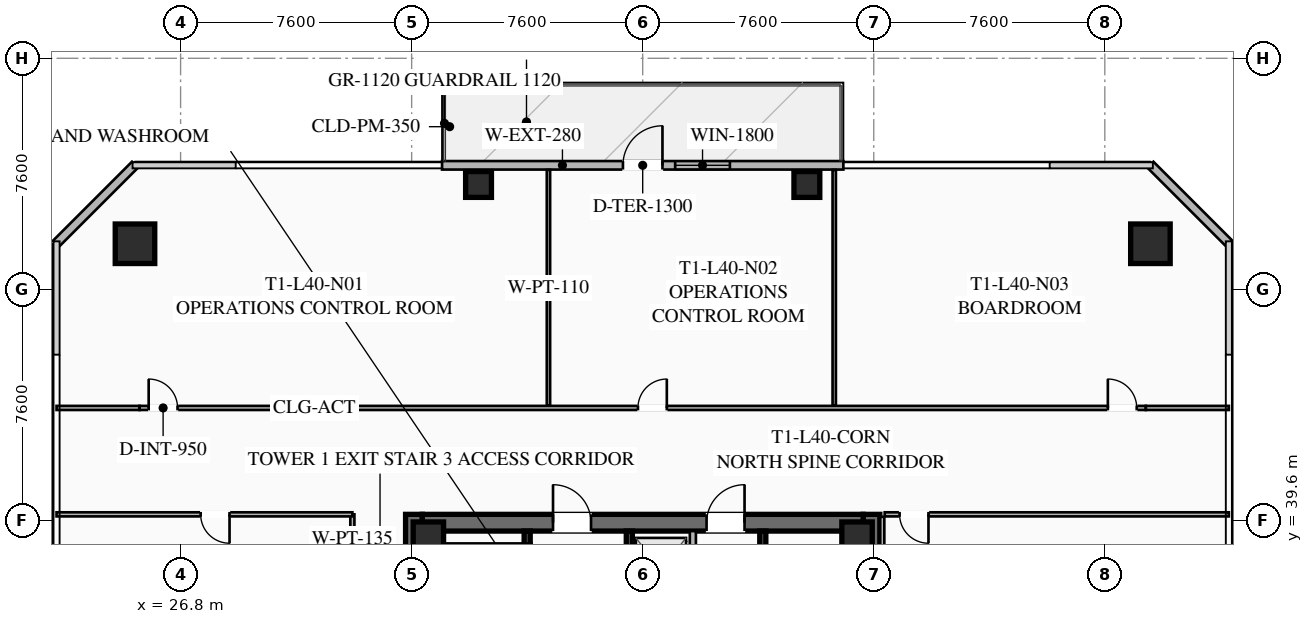
"""IFC4 building model, lengths in metres.
Left out: names, types, materials, properties, quantities, classifications, styles, units other than length and angle.
Written with IfcOpenShell. Run it as: python <this file> out.ifc"""

import sys

from ifc_helpers import new_model, si_unit, direction, frame, frame_2d, origin, origin_2d, place, context, subcontext, project, spatial, rectangle, hollow_rectangle, extrude, element, fill, save


model = new_model("IFC4")
c1 = context("Model", 3, precision=1e-05, world=origin(), true_north=direction((0.0, 1.0)))
c2 = subcontext(c1, "Body", "Model", "MODEL_VIEW")
j1 = project(units=[si_unit("LENGTHUNIT", "METRE"), si_unit("PLANEANGLEUNIT", "RADIAN")], contexts=[c1])
p1 = place(None, origin())
s1 = spatial("IfcSite", under=j1, at=p1, CompositionType="ELEMENT")
p2 = place(p1, origin())
s2 = spatial("IfcBuilding", under=s1, at=p2, CompositionType="ELEMENT")
p3 = place(p2, frame((0.0, 0.0, 149.9)))
s3 = spatial("IfcBuildingStorey", under=s2, at=p3, CompositionType="ELEMENT", Elevation=149.9)
for number, where, z_axis, x_axis in (
    (1, (34.475, 24.2, 0.0), (0.0, 0.0, 1.0), (0.0, 1.0, 0.0)),
    (2, (49.525, 39.8, 0.0), (0.0, 0.0, 1.0), (0.0, -1.0, 0.0)),
):
    element("IfcWall", number, at=place(p3, frame(where, z_axis=z_axis, x_axis=x_axis)), inside=s3, PredefinedType="SHEAR", context=c2, shape_type="SweptSolid", body=[
        extrude(rectangle(XDim=15.6, YDim=0.55, at=frame_2d((7.8, 0.0))), origin(), (0.0, 0.0, 1.0), 3.55),
    ])
p4 = place(p3, frame((34.75, 39.525, 0.0), z_axis=(0.0, 0.0, 1.0), x_axis=(1.0, 0.0, 0.0)))
e3 = element("IfcWall", 3, at=p4, inside=s3, PredefinedType="SHEAR", context=c2, shape_type="SweptSolid", body=[
    extrude(rectangle(XDim=14.5, YDim=0.55, at=frame_2d((7.25, 0.0))), origin(), (0.0, 0.0, 1.0), 3.55),
])
p5 = place(p4, frame((4.3, 0.0, 0.0)))
e4 = element("IfcOpeningElement", 4, at=p5, cuts=e3, PredefinedType="OPENING", context=c2, shape_type="SweptSolid", body=[
    extrude(rectangle(XDim=1.25, YDim=2.25, at=frame_2d((0.625, 1.125))), frame((0.0, 0.285, 0.0), z_axis=(0.0, -1.0, 0.0), x_axis=(1.0, 0.0, 0.0)), (0.0, 0.0, 1.0), 0.57),
])
p6 = place(p4, frame((9.35, 0.0, 0.0)))
e5 = element("IfcOpeningElement", 5, at=p6, cuts=e3, PredefinedType="OPENING", context=c2, shape_type="SweptSolid", body=[
    extrude(rectangle(XDim=1.25, YDim=2.25, at=frame_2d((0.625, 1.125))), frame((0.0, 0.285, 0.0), z_axis=(0.0, -1.0, 0.0), x_axis=(1.0, 0.0, 0.0)), (0.0, 0.0, 1.0), 0.57),
])
for number, where, z_axis, x_axis in (
    (6, (49.05, 39.05, 0.0), (0.0, 0.0, 1.0), (1.0, 0.0, 0.0)),
    (7, (34.95, 39.05, 0.0), (0.0, 0.0, 1.0), (1.0, 0.0, 0.0)),
):
    element("IfcColumn", number, at=place(p3, frame(where, z_axis=z_axis, x_axis=x_axis)), inside=s3, PredefinedType="COLUMN", context=c2, shape_type="SweptSolid", body=[
        extrude(hollow_rectangle(XDim=1.0, YDim=1.0, WallThickness=0.04, at=origin_2d()), origin(), (0.0, 0.0, 1.0), 3.37),
    ])
for number, where, z_axis, x_axis in (
    (8, (58.7, 48.7, 0.0), (0.0, 0.0, 1.0), (1.0, 0.0, 0.0)),
    (9, (25.3, 48.7, 0.0), (0.0, 0.0, 1.0), (1.0, 0.0, 0.0)),
):
    element("IfcColumn", number, at=place(p3, frame(where, z_axis=z_axis, x_axis=x_axis)), inside=s3, PredefinedType="COLUMN", context=c2, shape_type="SweptSolid", body=[
        extrude(hollow_rectangle(XDim=1.3, YDim=1.3, WallThickness=0.05, at=origin_2d()), origin(), (0.0, 0.0, 1.0), 3.37),
    ])
for number, where, z_axis, x_axis in (
    (10, (47.4, 50.65, 0.0), (0.0, 0.0, 1.0), (1.0, 0.0, 0.0)),
    (11, (36.6, 50.65, 0.0), (0.0, 0.0, 1.0), (1.0, 0.0, 0.0)),
):
    element("IfcColumn", number, at=place(p3, frame(where, z_axis=z_axis, x_axis=x_axis)), inside=s3, PredefinedType="COLUMN", context=c2, shape_type="SweptSolid", body=[
        extrude(hollow_rectangle(XDim=0.85, YDim=0.85, WallThickness=0.035, at=origin_2d()), origin(), (0.0, 0.0, 1.0), 3.37),
    ])
p7 = place(p3, frame((35.4, 51.28, 0.0), z_axis=(0.0, 0.0, 1.0), x_axis=(1.0, 0.0, 0.0)))
e12 = element("IfcWall", 12, at=p7, inside=s3, PredefinedType="SOLIDWALL", context=c2, shape_type="SweptSolid", body=[
    extrude(rectangle(XDim=13.2, YDim=0.28, at=frame_2d((6.6, 0.0))), origin(), (0.0, 0.0, 1.0), 3.37),
])
p8 = place(p7, frame((5.95, 0.0, 0.0)))
e13 = element("IfcOpeningElement", 13, at=p8, cuts=e12, PredefinedType="OPENING", context=c2, shape_type="SweptSolid", body=[
    extrude(rectangle(XDim=1.3, YDim=2.15, at=frame_2d((0.65, 1.075))), frame((0.0, 0.15, 0.0), z_axis=(0.0, -1.0, 0.0), x_axis=(1.0, 0.0, 0.0)), (0.0, 0.0, 1.0), 0.3),
])
p9 = place(p7, frame((7.668, 0.0, 0.85)))
e14 = element("IfcOpeningElement", 14, at=p9, cuts=e12, PredefinedType="OPENING", context=c2, shape_type="SweptSolid", body=[
    extrude(rectangle(XDim=1.8, YDim=1.92, at=frame_2d((0.9, 0.96))), frame((0.0, 0.15, 0.0), z_axis=(0.0, -1.0, 0.0), x_axis=(1.0, 0.0, 0.0)), (0.0, 0.0, 1.0), 0.3),
])
for number, where, z_axis, x_axis in (
    (15, (22.7, 48.7, 0.0), (0.0, 0.0, 1.0), (0.707, 0.707, 0.0)),
    (16, (58.7, 51.3, 0.0), (0.0, 0.0, 1.0), (0.707, -0.707, 0.0)),
):
    element("IfcWall", number, at=place(p3, frame(where, z_axis=z_axis, x_axis=x_axis)), inside=s3, PredefinedType="SOLIDWALL", context=c2, shape_type="SweptSolid", body=[
        extrude(rectangle(XDim=3.677, YDim=0.28, at=frame_2d((1.838, 0.0))), origin(), (0.0, 0.0, 1.0), 3.37),
    ])
p10 = place(p3, frame((38.2, 31.2, 0.0), z_axis=(0.0, 0.0, 1.0), x_axis=(0.0, 1.0, 0.0)))
e17 = element("IfcWall", 17, at=p10, inside=s3, PredefinedType="SHEAR", context=c2, shape_type="SweptSolid", body=[
    extrude(rectangle(XDim=8.05, YDim=0.2, at=frame_2d((4.025, 0.0))), origin(), (0.0, 0.0, 1.0), 3.37),
])
p11 = place(p10, frame((0.45, 0.0, 0.0)))
e18 = element("IfcOpeningElement", 18, at=p11, cuts=e17, PredefinedType="OPENING", context=c2, shape_type="SweptSolid", body=[
    extrude(rectangle(XDim=1.15, YDim=2.2, at=frame_2d((0.575, 1.1))), frame((0.0, 0.11, 0.0), z_axis=(0.0, -1.0, 0.0), x_axis=(1.0, 0.0, 0.0)), (0.0, 0.0, 1.0), 0.22),
])
p12 = place(p3, frame((41.56, 24.75, 0.0), z_axis=(0.0, 0.0, 1.0), x_axis=(0.0, 1.0, 0.0)))
e19 = element("IfcWall", 19, at=p12, inside=s3, PredefinedType="SHEAR", context=c2, shape_type="SweptSolid", body=[
    extrude(rectangle(XDim=14.5, YDim=0.2, at=frame_2d((7.25, 0.0))), origin(), (0.0, 0.0, 1.0), 3.37),
])
p13 = place(p3, frame((45.95, 39.25, 0.0), z_axis=(0.0, 0.0, 1.0), x_axis=(0.0, -1.0, 0.0)))
e20 = element("IfcWall", 20, at=p13, inside=s3, PredefinedType="SHEAR", context=c2, shape_type="SweptSolid", body=[
    extrude(rectangle(XDim=6.45, YDim=0.2, at=frame_2d((3.225, 0.0))), origin(), (0.0, 0.0, 1.0), 3.37),
])
p14 = place(p3, frame((43.65, 32.35, 0.0), z_axis=(0.0, 0.0, 1.0), x_axis=(0.0, 1.0, 0.0)))
e21 = element("IfcWall", 21, at=p14, inside=s3, PredefinedType="SOLIDWALL", context=c2, shape_type="SweptSolid", body=[
    extrude(rectangle(XDim=6.9, YDim=0.2, at=frame_2d((3.45, 0.0))), origin(), (0.0, 0.0, 1.0), 3.37),
])
p15 = place(p14, frame((0.575, 0.0, 0.0)))
e22 = element("IfcOpeningElement", 22, at=p15, cuts=e21, PredefinedType="OPENING", context=c2, shape_type="SweptSolid", body=[
    extrude(rectangle(XDim=1.1, YDim=2.2, at=frame_2d((0.55, 1.1))), frame((0.0, 0.11, 0.0), z_axis=(0.0, -1.0, 0.0), x_axis=(1.0, 0.0, 0.0)), (0.0, 0.0, 1.0), 0.22),
])
p16 = place(p14, frame((2.825, 0.0, 0.0)))
e23 = element("IfcOpeningElement", 23, at=p16, cuts=e21, PredefinedType="OPENING", context=c2, shape_type="SweptSolid", body=[
    extrude(rectangle(XDim=1.1, YDim=2.2, at=frame_2d((0.55, 1.1))), frame((0.0, 0.11, 0.0), z_axis=(0.0, -1.0, 0.0), x_axis=(1.0, 0.0, 0.0)), (0.0, 0.0, 1.0), 0.22),
])
p17 = place(p14, frame((5.075, 0.0, 0.0)))
e24 = element("IfcOpeningElement", 24, at=p17, cuts=e21, PredefinedType="OPENING", context=c2, shape_type="SweptSolid", body=[
    extrude(rectangle(XDim=1.1, YDim=2.2, at=frame_2d((0.55, 1.1))), frame((0.0, 0.11, 0.0), z_axis=(0.0, -1.0, 0.0), x_axis=(1.0, 0.0, 0.0)), (0.0, 0.0, 1.0), 0.22),
])
p18 = place(p3, frame((32.45, 35.4, 0.0), z_axis=(0.0, 0.0, 1.0), x_axis=(0.0, 1.0, 0.0)))
e25 = element("IfcWall", 25, at=p18, inside=s3, PredefinedType="PARTITIONING", context=c2, shape_type="SweptSolid", body=[
    extrude(rectangle(XDim=4.4, YDim=0.135, at=frame_2d((2.2, 0.0))), origin(), (0.0, 0.0, 1.0), 2.723),
])
p19 = place(p3, frame((25.45, 43.3, 0.0), z_axis=(0.0, 0.0, 1.0), x_axis=(1.0, 0.0, 0.0)))
e26 = element("IfcWall", 26, at=p19, inside=s3, PredefinedType="PARTITIONING", context=c2, shape_type="SweptSolid", body=[
    extrude(rectangle(XDim=33.1, YDim=0.135, at=frame_2d((16.55, 0.0))), origin(), (0.0, 0.0, 1.0), 2.723),
])
p20 = place(p19, frame((0.3, 0.0, 0.0)))
e27 = element("IfcOpeningElement", 27, at=p20, cuts=e26, PredefinedType="OPENING", context=c2, shape_type="SweptSolid", body=[
    extrude(rectangle(XDim=0.95, YDim=2.05, at=frame_2d((0.475, 1.025))), frame((0.0, 0.077, 0.0), z_axis=(0.0, -1.0, 0.0), x_axis=(1.0, 0.0, 0.0)), (0.0, 0.0, 1.0), 0.155),
])
p21 = place(p19, frame((16.393, 0.0, 0.0)))
e28 = element("IfcOpeningElement", 28, at=p21, cuts=e26, PredefinedType="OPENING", context=c2, shape_type="SweptSolid", body=[
    extrude(rectangle(XDim=0.95, YDim=2.05, at=frame_2d((0.475, 1.025))), frame((0.0, 0.077, 0.0), z_axis=(0.0, -1.0, 0.0), x_axis=(1.0, 0.0, 0.0)), (0.0, 0.0, 1.0), 0.155),
])
p22 = place(p19, frame((31.85, 0.0, 0.0)))
e29 = element("IfcOpeningElement", 29, at=p22, cuts=e26, PredefinedType="OPENING", context=c2, shape_type="SweptSolid", body=[
    extrude(rectangle(XDim=0.95, YDim=2.05, at=frame_2d((0.475, 1.025))), frame((0.0, 0.077, 0.0), z_axis=(0.0, -1.0, 0.0), x_axis=(1.0, 0.0, 0.0)), (0.0, 0.0, 1.0), 0.155),
])
for number, where, z_axis, x_axis in (
    (30, (22.72, 43.3, 0.0), (0.0, 0.0, 1.0), (1.0, 0.0, 0.0)),
    (31, (58.55, 43.3, 0.0), (0.0, 0.0, 1.0), (1.0, 0.0, 0.0)),
):
    element("IfcWall", number, at=place(p3, frame(where, z_axis=z_axis, x_axis=x_axis)), inside=s3, PredefinedType="PARTITIONING", context=c2, shape_type="SweptSolid", body=[
        extrude(rectangle(XDim=2.73, YDim=0.135, at=frame_2d((1.365, 0.0))), origin(), (0.0, 0.0, 1.0), 2.723),
    ])
for number, where, z_axis, x_axis in (
    (32, (38.9, 43.38, 0.0), (0.0, 0.0, 1.0), (0.0, 1.0, 0.0)),
    (33, (48.3, 43.38, 0.0), (0.0, 0.0, 1.0), (0.0, 1.0, 0.0)),
):
    element("IfcWall", number, at=place(p3, frame(where, z_axis=z_axis, x_axis=x_axis)), inside=s3, PredefinedType="PARTITIONING", context=c2, shape_type="SweptSolid", body=[
        extrude(rectangle(XDim=7.75, YDim=0.11, at=frame_2d((3.875, 0.0))), origin(), (0.0, 0.0, 1.0), 2.723),
    ])
p23 = place(p3, frame((49.88, 39.72, 0.0), z_axis=(0.0, 0.0, 1.0), x_axis=(0.0, -1.0, 0.0)))
e34 = element("IfcWall", 34, at=p23, inside=s3, PredefinedType="PARTITIONING", context=c2, shape_type="SweptSolid", body=[
    extrude(rectangle(XDim=15.44, YDim=0.135, at=frame_2d((7.72, 0.0))), origin(), (0.0, 0.0, 1.0), 2.723),
])
p24 = place(p3, frame((61.28, 39.8, 0.0), z_axis=(0.0, 0.0, 1.0), x_axis=(-1.0, 0.0, 0.0)))
e35 = element("IfcWall", 35, at=p24, inside=s3, PredefinedType="PARTITIONING", context=c2, shape_type="SweptSolid", body=[
    extrude(rectangle(XDim=11.32, YDim=0.135, at=frame_2d((5.66, 0.0))), origin(), (0.0, 0.0, 1.0), 2.723),
])
p25 = place(p24, frame((9.88, 0.0, 0.0)))
e36 = element("IfcOpeningElement", 36, at=p25, cuts=e35, PredefinedType="OPENING", context=c2, shape_type="SweptSolid", body=[
    extrude(rectangle(XDim=0.95, YDim=2.05, at=frame_2d((0.475, 1.025))), frame((0.0, 0.077, 0.0), z_axis=(0.0, -1.0, 0.0), x_axis=(1.0, 0.0, 0.0)), (0.0, 0.0, 1.0), 0.155),
])
p26 = place(p3, frame((32.45, 39.8, 0.0), z_axis=(0.0, 0.0, 1.0), x_axis=(-1.0, 0.0, 0.0)))
e37 = element("IfcWall", 37, at=p26, inside=s3, PredefinedType="PARTITIONING", context=c2, shape_type="SweptSolid", body=[
    extrude(rectangle(XDim=9.73, YDim=0.135, at=frame_2d((4.865, 0.0))), origin(), (0.0, 0.0, 1.0), 2.723),
])
p27 = place(p26, frame((4.04, 0.0, 0.0)))
e38 = element("IfcOpeningElement", 38, at=p27, cuts=e37, PredefinedType="OPENING", context=c2, shape_type="SweptSolid", body=[
    extrude(rectangle(XDim=0.95, YDim=2.05, at=frame_2d((0.475, 1.025))), frame((0.0, 0.077, 0.0), z_axis=(0.0, -1.0, 0.0), x_axis=(1.0, 0.0, 0.0)), (0.0, 0.0, 1.0), 0.155),
])
p28 = place(p8, origin())
e39 = element("IfcDoor", 39, at=p28, inside=s3, OperationType="SINGLE_SWING_RIGHT", PredefinedType="DOOR", context=c2, shape_type="SweptSolid", body=[
    extrude(rectangle(XDim=1.3, YDim=2.15, at=frame_2d((0.65, 1.075))), frame((0.0, 0.025, 0.0), z_axis=(0.0, -1.0, 0.0), x_axis=(1.0, 0.0, 0.0)), (0.0, 0.0, 1.0), 0.05),
])
fill(e13, e39)
p29 = place(p9, origin())
e40 = element("IfcWindow", 40, at=p29, inside=s3, PartitioningType="SINGLE_PANEL", PredefinedType="WINDOW", context=c2, shape_type="SweptSolid", body=[
    extrude(rectangle(XDim=1.8, YDim=1.92, at=frame_2d((0.9, 0.96))), frame((0.0, 0.03, 0.0), z_axis=(0.0, -1.0, 0.0), x_axis=(1.0, 0.0, 0.0)), (0.0, 0.0, 1.0), 0.06),
])
fill(e14, e40)
p30 = place(p5, origin())
e41 = element("IfcDoor", 41, at=p30, inside=s3, OperationType="SINGLE_SWING_LEFT", PredefinedType="DOOR", context=c2, shape_type="SweptSolid", body=[
    extrude(rectangle(XDim=1.25, YDim=2.25, at=frame_2d((0.625, 1.125))), frame((0.0, 0.025, 0.0), z_axis=(0.0, -1.0, 0.0), x_axis=(1.0, 0.0, 0.0)), (0.0, 0.0, 1.0), 0.05),
])
fill(e4, e41)
p31 = place(p6, origin())
e42 = element("IfcDoor", 42, at=p31, inside=s3, OperationType="SINGLE_SWING_RIGHT", PredefinedType="DOOR", context=c2, shape_type="SweptSolid", body=[
    extrude(rectangle(XDim=1.25, YDim=2.25, at=frame_2d((0.625, 1.125))), frame((0.0, 0.025, 0.0), z_axis=(0.0, -1.0, 0.0), x_axis=(1.0, 0.0, 0.0)), (0.0, 0.0, 1.0), 0.05),
])
fill(e5, e42)
p32 = place(p20, origin())
e43 = element("IfcDoor", 43, at=p32, inside=s3, OperationType="SINGLE_SWING_LEFT", PredefinedType="DOOR", context=c2, shape_type="SweptSolid", body=[
    extrude(rectangle(XDim=0.95, YDim=2.05, at=frame_2d((0.475, 1.025))), frame((0.0, 0.025, 0.0), z_axis=(0.0, -1.0, 0.0), x_axis=(1.0, 0.0, 0.0)), (0.0, 0.0, 1.0), 0.05),
])
fill(e27, e43)
p33 = place(p21, origin())
e44 = element("IfcDoor", 44, at=p33, inside=s3, OperationType="SINGLE_SWING_RIGHT", PredefinedType="DOOR", context=c2, shape_type="SweptSolid", body=[
    extrude(rectangle(XDim=0.95, YDim=2.05, at=frame_2d((0.475, 1.025))), frame((0.0, 0.025, 0.0), z_axis=(0.0, -1.0, 0.0), x_axis=(1.0, 0.0, 0.0)), (0.0, 0.0, 1.0), 0.05),
])
fill(e28, e44)
p34 = place(p22, origin())
e45 = element("IfcDoor", 45, at=p34, inside=s3, OperationType="SINGLE_SWING_LEFT", PredefinedType="DOOR", context=c2, shape_type="SweptSolid", body=[
    extrude(rectangle(XDim=0.95, YDim=2.05, at=frame_2d((0.475, 1.025))), frame((0.0, 0.025, 0.0), z_axis=(0.0, -1.0, 0.0), x_axis=(1.0, 0.0, 0.0)), (0.0, 0.0, 1.0), 0.05),
])
fill(e29, e45)
p35 = place(p25, origin())
e46 = element("IfcDoor", 46, at=p35, inside=s3, OperationType="SINGLE_SWING_LEFT", PredefinedType="DOOR", context=c2, shape_type="SweptSolid", body=[
    extrude(rectangle(XDim=0.95, YDim=2.05, at=frame_2d((0.475, 1.025))), frame((0.0, 0.025, 0.0), z_axis=(0.0, -1.0, 0.0), x_axis=(1.0, 0.0, 0.0)), (0.0, 0.0, 1.0), 0.05),
])
fill(e36, e46)
p36 = place(p27, origin())
e47 = element("IfcDoor", 47, at=p36, inside=s3, OperationType="SINGLE_SWING_LEFT", PredefinedType="DOOR", context=c2, shape_type="SweptSolid", body=[
    extrude(rectangle(XDim=0.95, YDim=2.05, at=frame_2d((0.475, 1.025))), frame((0.0, 0.025, 0.0), z_axis=(0.0, -1.0, 0.0), x_axis=(1.0, 0.0, 0.0)), (0.0, 0.0, 1.0), 0.05),
])
fill(e38, e47)
save(model, sys.argv[1])
